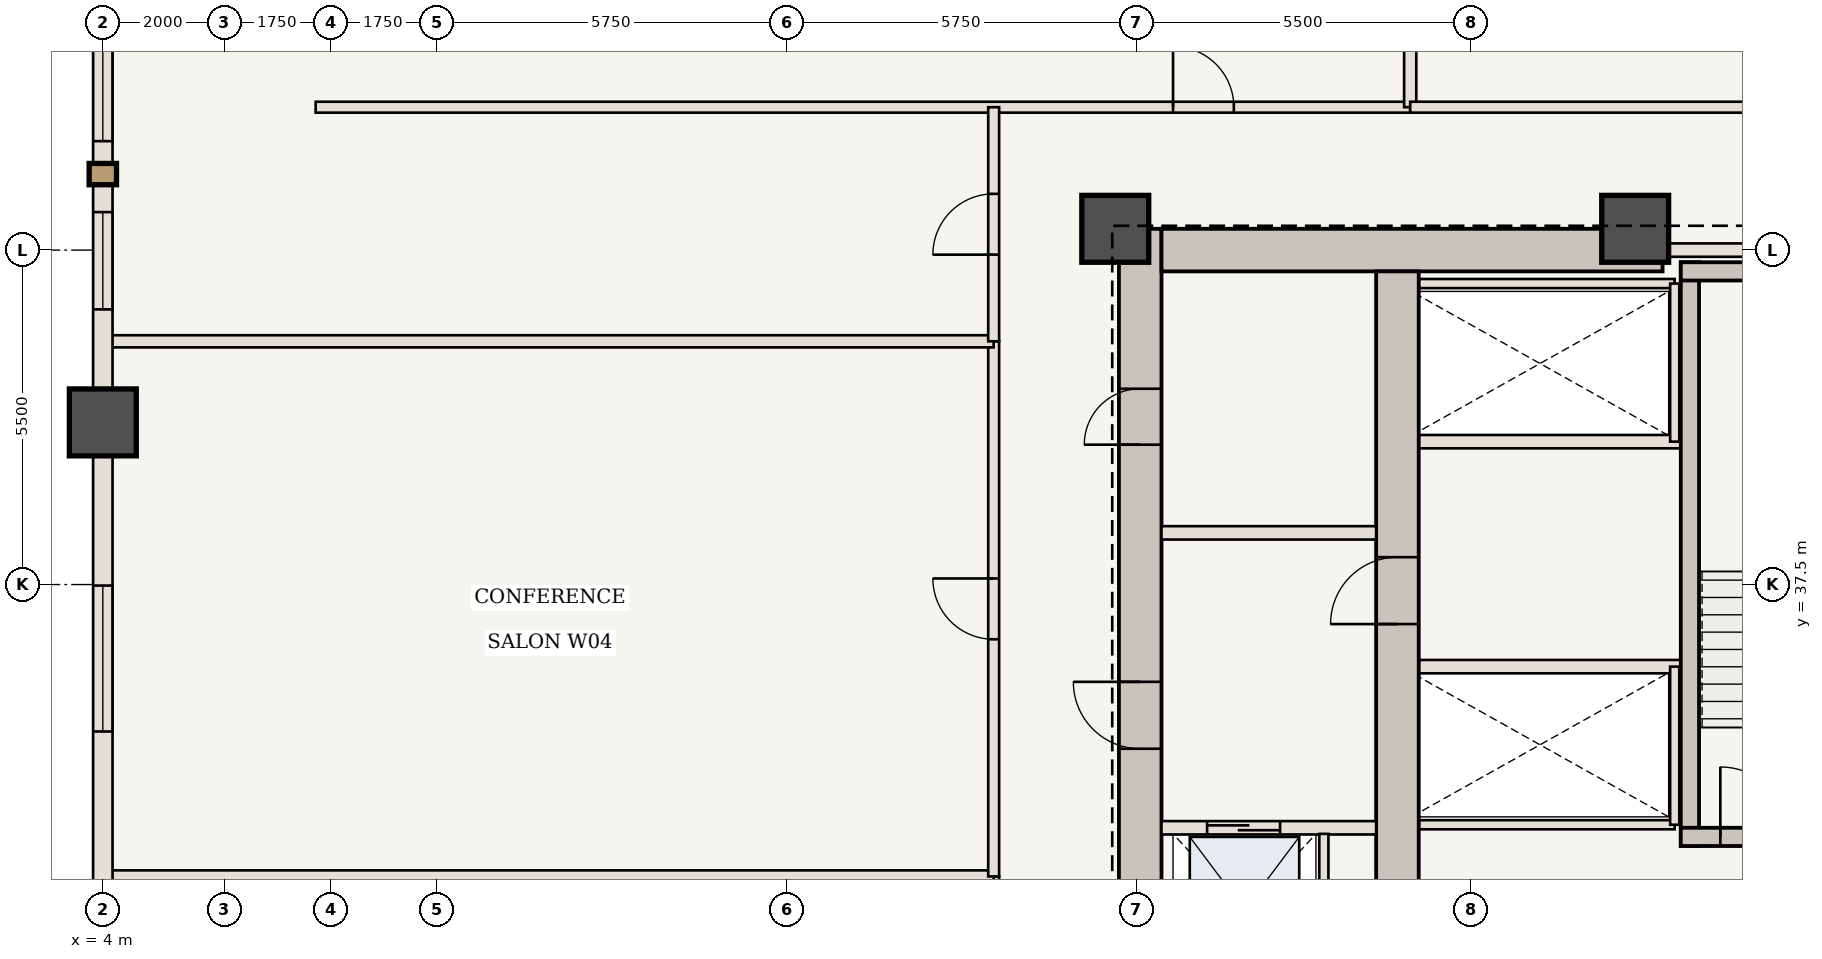
"""IFC4 building model, lengths in metres.
Left out: names, types, materials, properties, quantities, classifications, styles, units other than length and angle.
Written with IfcOpenShell. Run it as: python <this file> out.ifc"""

import sys

from ifc_helpers import new_model, si_unit, direction, frame, frame_2d, origin, origin_2d, place, context, subcontext, project, spatial, rectangle, extrude, element, fill, save


model = new_model("IFC4")
c1 = context("Model", 3, precision=1e-05, world=origin(), true_north=direction((0.0, 1.0)))
c2 = subcontext(c1, "Body", "Model", "MODEL_VIEW")
j1 = project(units=[si_unit("LENGTHUNIT", "METRE"), si_unit("PLANEANGLEUNIT", "RADIAN")], contexts=[c1])
p1 = place(None, origin())
s1 = spatial("IfcSite", under=j1, at=p1, CompositionType="ELEMENT")
p2 = place(p1, origin())
s2 = spatial("IfcBuilding", under=s1, at=p2, CompositionType="ELEMENT")
p3 = place(p2, frame((0.0, 0.0, 59.85)))
s3 = spatial("IfcBuildingStorey", under=s2, at=p3, CompositionType="ELEMENT", Elevation=59.85)
p4 = place(p3, frame((21.06, 30.6, 0.0), z_axis=(0.0, 0.0, 1.0), x_axis=(0.0, 1.0, 0.0)))
e1 = element("IfcWall", 1, at=p4, inside=s3, PredefinedType="SHEAR", context=c2, shape_type="SweptSolid", body=[
    extrude(rectangle(XDim=12.75, YDim=0.7, at=frame_2d((6.375, 0.0))), origin(), (0.0, 0.0, 1.0), 3.5),
])
p5 = place(p4, frame((4.2, 0.0, 0.0)))
e2 = element("IfcOpeningElement", 2, at=p5, cuts=e1, PredefinedType="OPENING", context=c2, shape_type="SweptSolid", body=[
    extrude(rectangle(XDim=1.1, YDim=2.15, at=frame_2d((0.55, 1.075))), frame((0.0, 0.36, 0.0), z_axis=(0.0, -1.0, 0.0), x_axis=(1.0, 0.0, 0.0)), (0.0, 0.0, 1.0), 0.72),
])
p6 = place(p4, frame((9.2, 0.0, 0.0)))
e3 = element("IfcOpeningElement", 3, at=p6, cuts=e1, PredefinedType="OPENING", context=c2, shape_type="SweptSolid", body=[
    extrude(rectangle(XDim=0.92, YDim=2.1, at=frame_2d((0.46, 1.05))), frame((0.0, 0.36, 0.0), z_axis=(0.0, -1.0, 0.0), x_axis=(1.0, 0.0, 0.0)), (0.0, 0.0, 1.0), 0.72),
])
p7 = place(p3, frame((21.41, 43.0, 0.0), z_axis=(0.0, 0.0, 1.0), x_axis=(1.0, 0.0, 0.0)))
e4 = element("IfcWall", 4, at=p7, inside=s3, PredefinedType="SHEAR", context=c2, shape_type="SweptSolid", body=[
    extrude(rectangle(XDim=8.24, YDim=0.7, at=frame_2d((4.12, 0.0))), origin(), (0.0, 0.0, 1.0), 3.5),
])
p8 = place(p3, frame((25.29, 30.6, 0.0), z_axis=(0.0, 0.0, 1.0), x_axis=(0.0, 1.0, 0.0)))
e5 = element("IfcWall", 5, at=p8, inside=s3, PredefinedType="SHEAR", context=c2, shape_type="SweptSolid", body=[
    extrude(rectangle(XDim=12.05, YDim=0.7, at=frame_2d((6.025, 0.0))), origin(), (0.0, 0.0, 1.0), 3.5),
])
p9 = place(p8, frame((6.25, 0.0, 0.0)))
e6 = element("IfcOpeningElement", 6, at=p9, cuts=e5, PredefinedType="OPENING", context=c2, shape_type="SweptSolid", body=[
    extrude(rectangle(XDim=1.1, YDim=2.15, at=frame_2d((0.55, 1.075))), frame((0.0, 0.36, 0.0), z_axis=(0.0, -1.0, 0.0), x_axis=(1.0, 0.0, 0.0)), (0.0, 0.0, 1.0), 0.72),
])
for number, where, z_axis, x_axis in (
    (7, (29.2, 43.35, 0.0), (0.0, 0.0, 1.0), (1.0, 0.0, 0.0)),
    (8, (20.65, 43.35, 0.0), (0.0, 0.0, 1.0), (1.0, 0.0, 0.0)),
    (9, (4.0, 40.167, 0.0), (0.0, 0.0, 1.0), (1.0, 0.0, 0.0)),
):
    element("IfcColumn", number, at=place(p3, frame(where, z_axis=z_axis, x_axis=x_axis)), inside=s3, PredefinedType="COLUMN", context=c2, shape_type="SweptSolid", body=[
        extrude(rectangle(XDim=1.1, YDim=1.1, at=origin_2d()), origin(), (0.0, 0.0, 1.0), 3.5),
    ])
p10 = place(p3, frame((21.41, 33.5, 0.0), z_axis=(0.0, 0.0, 1.0), x_axis=(1.0, 0.0, 0.0)))
e10 = element("IfcWall", 10, at=p10, inside=s3, PredefinedType="STANDARD", context=c2, shape_type="SweptSolid", body=[
    extrude(rectangle(XDim=3.53, YDim=0.22, at=frame_2d((1.765, 0.0))), origin(), (0.0, 0.0, 1.0), 3.32),
])
p11 = place(p10, frame((0.75, 0.0, 0.0)))
e11 = element("IfcOpeningElement", 11, at=p11, cuts=e10, PredefinedType="OPENING", context=c2, shape_type="SweptSolid", body=[
    extrude(rectangle(XDim=1.2, YDim=2.2, at=frame_2d((0.6, 1.1))), frame((0.0, 0.12, 0.0), z_axis=(0.0, -1.0, 0.0), x_axis=(1.0, 0.0, 0.0)), (0.0, 0.0, 1.0), 0.24),
])
p12 = place(p3, frame((24.08, 30.75, 0.0), z_axis=(0.0, 0.0, 1.0), x_axis=(0.0, 1.0, 0.0)))
e12 = element("IfcWall", 12, at=p12, inside=s3, PredefinedType="STANDARD", context=c2, shape_type="SweptSolid", body=[
    extrude(rectangle(XDim=2.65, YDim=0.15, at=frame_2d((1.325, 0.0))), origin(), (0.0, 0.0, 1.0), 3.32),
])
p13 = place(p3, frame((21.41, 38.35, 0.0), z_axis=(0.0, 0.0, 1.0), x_axis=(1.0, 0.0, 0.0)))
e13 = element("IfcWall", 13, at=p13, inside=s3, PredefinedType="STANDARD", context=c2, shape_type="SweptSolid", body=[
    extrude(rectangle(XDim=3.53, YDim=0.22, at=frame_2d((1.765, 0.0))), origin(), (0.0, 0.0, 1.0), 3.32),
])
p14 = place(p3, frame((25.65, 36.15, 0.0), z_axis=(0.0, 0.0, 1.0), x_axis=(1.0, 0.0, 0.0)))
e14 = element("IfcWall", 14, at=p14, inside=s3, PredefinedType="STANDARD", context=c2, shape_type="SweptSolid", body=[
    extrude(rectangle(XDim=4.3, YDim=0.22, at=frame_2d((2.15, 0.0))), origin(), (0.0, 0.0, 1.0), 3.32),
])
p15 = place(p3, frame((25.65, 33.55, 0.0), z_axis=(0.0, 0.0, 1.0), x_axis=(1.0, 0.0, 0.0)))
e15 = element("IfcWall", 15, at=p15, inside=s3, PredefinedType="STANDARD", context=c2, shape_type="SweptSolid", body=[
    extrude(rectangle(XDim=4.2, YDim=0.15, at=frame_2d((2.1, 0.0))), origin(), (0.0, 0.0, 1.0), 3.32),
])
p16 = place(p3, frame((29.85, 33.55, 0.0), z_axis=(0.0, 0.0, 1.0), x_axis=(0.0, 1.0, 0.0)))
e16 = element("IfcWall", 16, at=p16, inside=s3, PredefinedType="STANDARD", context=c2, shape_type="SweptSolid", body=[
    extrude(rectangle(XDim=2.6, YDim=0.15, at=frame_2d((1.3, 0.0))), origin(), (0.0, 0.0, 1.0), 3.32),
])
p17 = place(p3, frame((25.65, 39.85, 0.0), z_axis=(0.0, 0.0, 1.0), x_axis=(1.0, 0.0, 0.0)))
e17 = element("IfcWall", 17, at=p17, inside=s3, PredefinedType="STANDARD", context=c2, shape_type="SweptSolid", body=[
    extrude(rectangle(XDim=4.3, YDim=0.22, at=frame_2d((2.15, 0.0))), origin(), (0.0, 0.0, 1.0), 3.32),
])
p18 = place(p3, frame((25.65, 42.45, 0.0), z_axis=(0.0, 0.0, 1.0), x_axis=(1.0, 0.0, 0.0)))
e18 = element("IfcWall", 18, at=p18, inside=s3, PredefinedType="STANDARD", context=c2, shape_type="SweptSolid", body=[
    extrude(rectangle(XDim=4.2, YDim=0.15, at=frame_2d((2.1, 0.0))), origin(), (0.0, 0.0, 1.0), 3.32),
])
p19 = place(p3, frame((29.85, 39.85, 0.0), z_axis=(0.0, 0.0, 1.0), x_axis=(0.0, 1.0, 0.0)))
e19 = element("IfcWall", 19, at=p19, inside=s3, PredefinedType="STANDARD", context=c2, shape_type="SweptSolid", body=[
    extrude(rectangle(XDim=2.6, YDim=0.15, at=frame_2d((1.3, 0.0))), origin(), (0.0, 0.0, 1.0), 3.32),
])
p20 = place(p3, frame((30.1, 33.2, 0.0), z_axis=(0.0, 0.0, 1.0), x_axis=(0.0, 1.0, 0.0)))
e20 = element("IfcWall", 20, at=p20, inside=s3, PredefinedType="SHEAR", context=c2, shape_type="SweptSolid", body=[
    extrude(rectangle(XDim=9.6, YDim=0.3, at=frame_2d((4.8, 0.0))), origin(), (0.0, 0.0, 1.0), 3.32),
])
p21 = place(p3, frame((29.95, 33.35, 0.0), z_axis=(0.0, 0.0, 1.0), x_axis=(1.0, 0.0, 0.0)))
e21 = element("IfcWall", 21, at=p21, inside=s3, PredefinedType="SHEAR", context=c2, shape_type="SweptSolid", body=[
    extrude(rectangle(XDim=4.05, YDim=0.3, at=frame_2d((2.025, 0.0))), origin(), (0.0, 0.0, 1.0), 3.32),
])
p22 = place(p21, frame((0.65, 0.0, 0.0)))
e22 = element("IfcOpeningElement", 22, at=p22, cuts=e21, PredefinedType="OPENING", context=c2, shape_type="SweptSolid", body=[
    extrude(rectangle(XDim=1.15, YDim=2.15, at=frame_2d((0.575, 1.075))), frame((0.0, 0.16, 0.0), z_axis=(0.0, -1.0, 0.0), x_axis=(1.0, 0.0, 0.0)), (0.0, 0.0, 1.0), 0.32),
])
p23 = place(p3, frame((29.95, 42.65, 0.0), z_axis=(0.0, 0.0, 1.0), x_axis=(1.0, 0.0, 0.0)))
e23 = element("IfcWall", 23, at=p23, inside=s3, PredefinedType="SHEAR", context=c2, shape_type="SweptSolid", body=[
    extrude(rectangle(XDim=4.05, YDim=0.3, at=frame_2d((2.025, 0.0))), origin(), (0.0, 0.0, 1.0), 3.32),
])
p24 = place(p3, frame((29.65, 43.0, 0.0), z_axis=(0.0, 0.0, 1.0), x_axis=(1.0, 0.0, 0.0)))
e24 = element("IfcWall", 24, at=p24, inside=s3, PredefinedType="STANDARD", context=c2, shape_type="SweptSolid", body=[
    extrude(rectangle(XDim=8.1, YDim=0.22, at=frame_2d((4.05, 0.0))), origin(), (0.0, 0.0, 1.0), 3.32),
])
p25 = place(p24, frame((5.95, 0.0, 0.0)))
e25 = element("IfcOpeningElement", 25, at=p25, cuts=e24, PredefinedType="OPENING", context=c2, shape_type="SweptSolid", body=[
    extrude(rectangle(XDim=1.1, YDim=2.15, at=frame_2d((0.55, 1.075))), frame((0.0, 0.12, 0.0), z_axis=(0.0, -1.0, 0.0), x_axis=(1.0, 0.0, 0.0)), (0.0, 0.0, 1.0), 0.24),
])
p26 = place(p3, frame((7.5, 45.35, 0.0), z_axis=(0.0, 0.0, 1.0), x_axis=(1.0, 0.0, 0.0)))
e26 = element("IfcWall", 26, at=p26, inside=s3, PredefinedType="STANDARD", context=c2, shape_type="SweptSolid", body=[
    extrude(rectangle(XDim=18.0, YDim=0.18, at=frame_2d((9.0, 0.0))), origin(), (0.0, 0.0, 1.0), 3.32),
])
p27 = place(p26, frame((14.1, 0.0, 0.0)))
e27 = element("IfcOpeningElement", 27, at=p27, cuts=e26, PredefinedType="OPENING", context=c2, shape_type="SweptSolid", body=[
    extrude(rectangle(XDim=1.0, YDim=2.15, at=frame_2d((0.5, 1.075))), frame((0.0, 0.1, 0.0), z_axis=(0.0, -1.0, 0.0), x_axis=(1.0, 0.0, 0.0)), (0.0, 0.0, 1.0), 0.2),
])
p28 = place(p3, frame((25.5, 45.35, 0.0), z_axis=(0.0, 0.0, 1.0), x_axis=(0.0, 1.0, 0.0)))
e28 = element("IfcWall", 28, at=p28, inside=s3, PredefinedType="STANDARD", context=c2, shape_type="SweptSolid", body=[
    extrude(rectangle(XDim=14.59, YDim=0.2, at=frame_2d((7.295, 0.0))), origin(), (0.0, 0.0, 1.0), 3.32),
])
p29 = place(p3, frame((25.5, 45.35, 0.0), z_axis=(0.0, 0.0, 1.0), x_axis=(1.0, 0.0, 0.0)))
e29 = element("IfcWall", 29, at=p29, inside=s3, PredefinedType="STANDARD", context=c2, shape_type="SweptSolid", body=[
    extrude(rectangle(XDim=14.0, YDim=0.18, at=frame_2d((7.0, 0.0))), origin(), (0.0, 0.0, 1.0), 3.32),
])
p30 = place(p29, frame((7.95, 0.0, 0.0)))
e30 = element("IfcOpeningElement", 30, at=p30, cuts=e29, PredefinedType="OPENING", context=c2, shape_type="SweptSolid", body=[
    extrude(rectangle(XDim=1.0, YDim=2.15, at=frame_2d((0.5, 1.075))), frame((0.0, 0.1, 0.0), z_axis=(0.0, -1.0, 0.0), x_axis=(1.0, 0.0, 0.0)), (0.0, 0.0, 1.0), 0.2),
])
p31 = place(p3, frame((18.65, 28.0, 0.0), z_axis=(0.0, 0.0, 1.0), x_axis=(0.0, 1.0, 0.0)))
e31 = element("IfcWall", 31, at=p31, inside=s3, PredefinedType="STANDARD", context=c2, shape_type="SweptSolid", body=[
    extrude(rectangle(XDim=4.7, YDim=0.18, at=frame_2d((2.35, 0.0))), origin(), (0.0, 0.0, 1.0), 3.32),
])
p32 = place(p31, frame((2.775, 0.0, 0.0)))
e32 = element("IfcOpeningElement", 32, at=p32, cuts=e31, PredefinedType="OPENING", context=c2, shape_type="SweptSolid", body=[
    extrude(rectangle(XDim=1.0, YDim=2.15, at=frame_2d((0.5, 1.075))), frame((0.0, 0.1, 0.0), z_axis=(0.0, -1.0, 0.0), x_axis=(1.0, 0.0, 0.0)), (0.0, 0.0, 1.0), 0.2),
])
p33 = place(p3, frame((4.06, 32.7, 0.0), z_axis=(0.0, 0.0, 1.0), x_axis=(1.0, 0.0, 0.0)))
e33 = element("IfcWall", 33, at=p33, inside=s3, PredefinedType="STANDARD", context=c2, shape_type="SweptSolid", body=[
    extrude(rectangle(XDim=14.59, YDim=0.2, at=frame_2d((7.295, 0.0))), origin(), (0.0, 0.0, 1.0), 3.32),
])
p34 = place(p3, frame((18.65, 32.7, 0.0), z_axis=(0.0, 0.0, 1.0), x_axis=(0.0, 1.0, 0.0)))
e34 = element("IfcWall", 34, at=p34, inside=s3, PredefinedType="STANDARD", context=c2, shape_type="SweptSolid", body=[
    extrude(rectangle(XDim=8.8, YDim=0.18, at=frame_2d((4.4, 0.0))), origin(), (0.0, 0.0, 1.0), 3.32),
])
p35 = place(p34, frame((3.9, 0.0, 0.0)))
e35 = element("IfcOpeningElement", 35, at=p35, cuts=e34, PredefinedType="OPENING", context=c2, shape_type="SweptSolid", body=[
    extrude(rectangle(XDim=1.0, YDim=2.15, at=frame_2d((0.5, 1.075))), frame((0.0, 0.1, 0.0), z_axis=(0.0, -1.0, 0.0), x_axis=(1.0, 0.0, 0.0)), (0.0, 0.0, 1.0), 0.2),
])
p36 = place(p3, frame((4.06, 41.5, 0.0), z_axis=(0.0, 0.0, 1.0), x_axis=(1.0, 0.0, 0.0)))
e36 = element("IfcWall", 36, at=p36, inside=s3, PredefinedType="STANDARD", context=c2, shape_type="SweptSolid", body=[
    extrude(rectangle(XDim=14.59, YDim=0.2, at=frame_2d((7.295, 0.0))), origin(), (0.0, 0.0, 1.0), 3.32),
])
p37 = place(p3, frame((18.65, 41.5, 0.0), z_axis=(0.0, 0.0, 1.0), x_axis=(0.0, 1.0, 0.0)))
e37 = element("IfcWall", 37, at=p37, inside=s3, PredefinedType="STANDARD", context=c2, shape_type="SweptSolid", body=[
    extrude(rectangle(XDim=3.85, YDim=0.18, at=frame_2d((1.925, 0.0))), origin(), (0.0, 0.0, 1.0), 3.32),
])
p38 = place(p37, frame((1.425, 0.0, 0.0)))
e38 = element("IfcOpeningElement", 38, at=p38, cuts=e37, PredefinedType="OPENING", context=c2, shape_type="SweptSolid", body=[
    extrude(rectangle(XDim=1.0, YDim=2.15, at=frame_2d((0.5, 1.075))), frame((0.0, 0.1, 0.0), z_axis=(0.0, -1.0, 0.0), x_axis=(1.0, 0.0, 0.0)), (0.0, 0.0, 1.0), 0.2),
])
p39 = place(p3, frame((4.0, 32.0, 0.0), z_axis=(0.0, 0.0, 1.0), x_axis=(0.0, 1.0, 0.0)))
e39 = element("IfcWall", 39, at=p39, inside=s3, PredefinedType="USERDEFINED", context=c2, shape_type="SweptSolid", body=[
    extrude(rectangle(XDim=8.167, YDim=0.32, at=frame_2d((4.083, 0.0))), origin(), (0.0, 0.0, 1.0), 2.52),
])
p40 = place(p39, frame((3.083, 0.0, 0.85)))
e40 = element("IfcOpeningElement", 40, at=p40, cuts=e39, PredefinedType="OPENING", context=c2, shape_type="SweptSolid", body=[
    extrude(rectangle(XDim=2.4, YDim=1.47, at=frame_2d((1.2, 0.735))), frame((0.0, 0.17, 0.0), z_axis=(0.0, -1.0, 0.0), x_axis=(1.0, 0.0, 0.0)), (0.0, 0.0, 1.0), 0.34),
])
p41 = place(p3, frame((4.0, 40.167, 0.0), z_axis=(0.0, 0.0, 1.0), x_axis=(0.0, 1.0, 0.0)))
e41 = element("IfcWall", 41, at=p41, inside=s3, PredefinedType="USERDEFINED", context=c2, shape_type="SweptSolid", body=[
    extrude(rectangle(XDim=8.167, YDim=0.32, at=frame_2d((4.083, 0.0))), origin(), (0.0, 0.0, 1.0), 2.52),
])
p42 = place(p41, frame((1.858, 0.0, 0.85)))
e42 = element("IfcOpeningElement", 42, at=p42, cuts=e41, PredefinedType="OPENING", context=c2, shape_type="SweptSolid", body=[
    extrude(rectangle(XDim=1.6, YDim=1.47, at=frame_2d((0.8, 0.735))), frame((0.0, 0.17, 0.0), z_axis=(0.0, -1.0, 0.0), x_axis=(1.0, 0.0, 0.0)), (0.0, 0.0, 1.0), 0.34),
])
p43 = place(p41, frame((4.625, 0.0, 0.85)))
e43 = element("IfcOpeningElement", 43, at=p43, cuts=e41, PredefinedType="OPENING", context=c2, shape_type="SweptSolid", body=[
    extrude(rectangle(XDim=2.8, YDim=1.47, at=frame_2d((1.4, 0.735))), frame((0.0, 0.17, 0.0), z_axis=(0.0, -1.0, 0.0), x_axis=(1.0, 0.0, 0.0)), (0.0, 0.0, 1.0), 0.34),
])
p44 = place(p5, origin())
e44 = element("IfcDoor", 44, at=p44, inside=s3, OperationType="SINGLE_SWING_RIGHT", PredefinedType="DOOR", context=c2, shape_type="SweptSolid", body=[
    extrude(rectangle(XDim=1.1, YDim=2.15, at=frame_2d((0.55, 1.075))), frame((0.0, 0.025, 0.0), z_axis=(0.0, -1.0, 0.0), x_axis=(1.0, 0.0, 0.0)), (0.0, 0.0, 1.0), 0.05),
])
fill(e2, e44)
p45 = place(p9, origin())
e45 = element("IfcDoor", 45, at=p45, inside=s3, OperationType="SINGLE_SWING_LEFT", PredefinedType="DOOR", context=c2, shape_type="SweptSolid", body=[
    extrude(rectangle(XDim=1.1, YDim=2.15, at=frame_2d((0.55, 1.075))), frame((0.0, 0.025, 0.0), z_axis=(0.0, -1.0, 0.0), x_axis=(1.0, 0.0, 0.0)), (0.0, 0.0, 1.0), 0.05),
])
fill(e6, e45)
p46 = place(p6, origin())
e46 = element("IfcDoor", 46, at=p46, inside=s3, OperationType="SINGLE_SWING_LEFT", PredefinedType="DOOR", context=c2, shape_type="SweptSolid", body=[
    extrude(rectangle(XDim=0.92, YDim=2.1, at=frame_2d((0.46, 1.05))), frame((0.0, 0.025, 0.0), z_axis=(0.0, -1.0, 0.0), x_axis=(1.0, 0.0, 0.0)), (0.0, 0.0, 1.0), 0.05),
])
fill(e3, e46)
p47 = place(p11, origin())
e47 = element("IfcDoor", 47, at=p47, inside=s3, OperationType="DOUBLE_DOOR_SLIDING", PredefinedType="DOOR", context=c2, shape_type="SweptSolid", body=[
    extrude(rectangle(XDim=1.2, YDim=2.2, at=frame_2d((0.6, 1.1))), frame((0.0, 0.025, 0.0), z_axis=(0.0, -1.0, 0.0), x_axis=(1.0, 0.0, 0.0)), (0.0, 0.0, 1.0), 0.05),
])
fill(e11, e47)
p48 = place(p22, origin())
e48 = element("IfcDoor", 48, at=p48, inside=s3, OperationType="SINGLE_SWING_LEFT", PredefinedType="DOOR", context=c2, shape_type="SweptSolid", body=[
    extrude(rectangle(XDim=1.15, YDim=2.15, at=frame_2d((0.575, 1.075))), frame((0.0, 0.025, 0.0), z_axis=(0.0, -1.0, 0.0), x_axis=(1.0, 0.0, 0.0)), (0.0, 0.0, 1.0), 0.05),
])
fill(e22, e48)
p49 = place(p27, origin())
e49 = element("IfcDoor", 49, at=p49, inside=s3, OperationType="SINGLE_SWING_LEFT", PredefinedType="DOOR", context=c2, shape_type="SweptSolid", body=[
    extrude(rectangle(XDim=1.0, YDim=2.15, at=frame_2d((0.5, 1.075))), frame((0.0, 0.025, 0.0), z_axis=(0.0, -1.0, 0.0), x_axis=(1.0, 0.0, 0.0)), (0.0, 0.0, 1.0), 0.05),
])
fill(e27, e49)
p50 = place(p35, origin())
e50 = element("IfcDoor", 50, at=p50, inside=s3, OperationType="SINGLE_SWING_RIGHT", PredefinedType="DOOR", context=c2, shape_type="SweptSolid", body=[
    extrude(rectangle(XDim=1.0, YDim=2.15, at=frame_2d((0.5, 1.075))), frame((0.0, 0.025, 0.0), z_axis=(0.0, -1.0, 0.0), x_axis=(1.0, 0.0, 0.0)), (0.0, 0.0, 1.0), 0.05),
])
fill(e35, e50)
p51 = place(p38, origin())
e51 = element("IfcDoor", 51, at=p51, inside=s3, OperationType="SINGLE_SWING_LEFT", PredefinedType="DOOR", context=c2, shape_type="SweptSolid", body=[
    extrude(rectangle(XDim=1.0, YDim=2.15, at=frame_2d((0.5, 1.075))), frame((0.0, 0.025, 0.0), z_axis=(0.0, -1.0, 0.0), x_axis=(1.0, 0.0, 0.0)), (0.0, 0.0, 1.0), 0.05),
])
fill(e38, e51)
p52 = place(p40, origin())
e52 = element("IfcWindow", 52, at=p52, inside=s3, PartitioningType="SINGLE_PANEL", PredefinedType="WINDOW", context=c2, shape_type="SweptSolid", body=[
    extrude(rectangle(XDim=2.4, YDim=1.47, at=frame_2d((1.2, 0.735))), frame((0.0, 0.03, 0.0), z_axis=(0.0, -1.0, 0.0), x_axis=(1.0, 0.0, 0.0)), (0.0, 0.0, 1.0), 0.06),
])
fill(e40, e52)
p53 = place(p42, origin())
e53 = element("IfcWindow", 53, at=p53, inside=s3, PartitioningType="SINGLE_PANEL", PredefinedType="WINDOW", context=c2, shape_type="SweptSolid", body=[
    extrude(rectangle(XDim=1.6, YDim=1.47, at=frame_2d((0.8, 0.735))), frame((0.0, 0.03, 0.0), z_axis=(0.0, -1.0, 0.0), x_axis=(1.0, 0.0, 0.0)), (0.0, 0.0, 1.0), 0.06),
])
fill(e42, e53)
p54 = place(p43, origin())
e54 = element("IfcWindow", 54, at=p54, inside=s3, PartitioningType="SINGLE_PANEL", PredefinedType="WINDOW", context=c2, shape_type="SweptSolid", body=[
    extrude(rectangle(XDim=2.8, YDim=1.47, at=frame_2d((1.4, 0.735))), frame((0.0, 0.03, 0.0), z_axis=(0.0, -1.0, 0.0), x_axis=(1.0, 0.0, 0.0)), (0.0, 0.0, 1.0), 0.06),
])
fill(e43, e54)
save(model, sys.argv[1])
